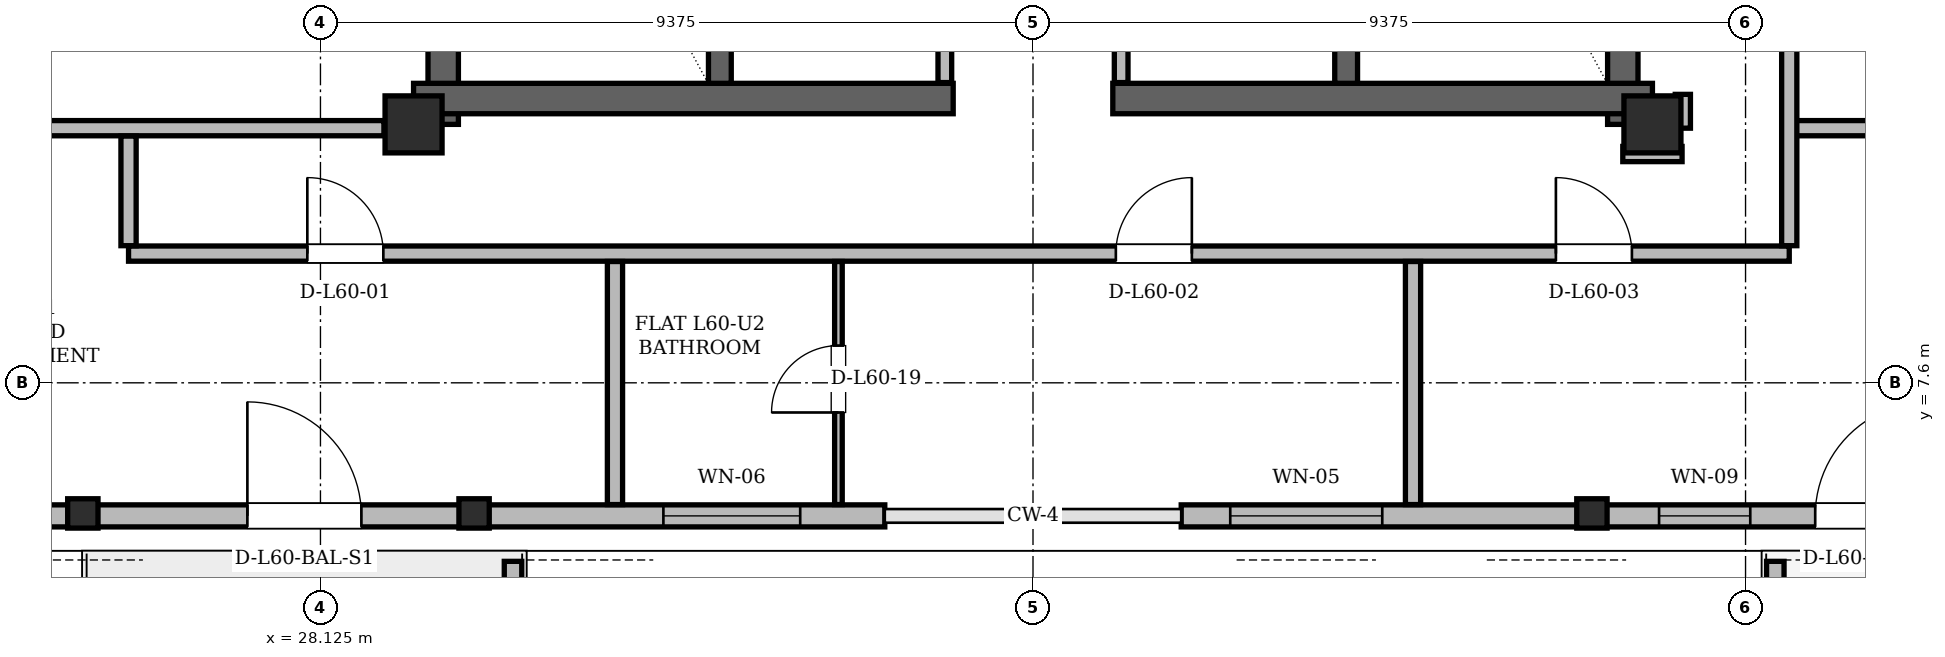
"""IFC4 building model, lengths in metres.
Left out: names, types, materials, properties, quantities, classifications, styles, units other than length and angle.
Written with IfcOpenShell. Run it as: python <this file> out.ifc"""

import sys

from ifc_helpers import new_model, si_unit, direction, frame, frame_2d, origin, origin_2d, place, context, subcontext, project, spatial, polyline, rectangle, hollow_rectangle, i_section, outline, extrude, element, fill, save


model = new_model("IFC4")
c1 = context("Model", 3, precision=1e-05, world=origin(), true_north=direction((0.0, 1.0)))
c2 = subcontext(c1, "Body", "Model", "MODEL_VIEW")
j1 = project(units=[si_unit("LENGTHUNIT", "METRE"), si_unit("PLANEANGLEUNIT", "RADIAN")], contexts=[c1])
p1 = place(None, origin())
s1 = spatial("IfcSite", under=j1, at=p1, CompositionType="ELEMENT")
p2 = place(p1, origin())
s2 = spatial("IfcBuilding", under=s1, at=p2, CompositionType="ELEMENT")
p3 = place(p2, frame((0.0, 0.0, 227.1)))
s3 = spatial("IfcBuildingStorey", under=s2, at=p3, CompositionType="ELEMENT", Elevation=227.1)
for number, where, z_axis, x_axis in (
    (1, (29.35, 11.0, 0.0), (0.0, 0.0, 1.0), (1.0, 0.0, 0.0)),
    (2, (45.65, 11.0, 0.0), (0.0, 0.0, 1.0), (1.0, 0.0, 0.0)),
):
    element("IfcColumn", number, at=place(p3, frame(where, z_axis=z_axis, x_axis=x_axis)), inside=s3, PredefinedType="COLUMN", context=c2, shape_type="SweptSolid", body=[
        extrude(hollow_rectangle(XDim=0.75, YDim=0.75, WallThickness=0.06, at=origin_2d()), origin(), (0.0, 0.0, 1.0), 3.6),
    ])
p4 = place(p3, frame((25.008, 5.849, 0.004), z_axis=(-0.00509802547, 0.018013023328, 0.999824755208), x_axis=(-0.962206045824, -0.272322465799, 0.0)))
e3 = element("IfcColumn", 3, at=p4, inside=s3, PredefinedType="COLUMN", context=c2, shape_type="SweptSolid", body=[
    extrude(i_section(OverallWidth=0.399, OverallDepth=0.386, WebThickness=0.021, FlangeThickness=0.033, at=origin_2d()), origin(), (0.0, 0.0, 1.0), 3.592),
])
for number, where, z_axis, x_axis in (
    (4, (30.152, 5.849, 0.004), (-0.003, 0.018, 1.0), (-0.987, -0.16, 0.0)),
    (5, (44.848, 5.849, 0.004), (0.003, 0.018, 1.0), (-0.987, 0.16, 0.0)),
):
    element("IfcColumn", number, at=place(p3, frame(where, z_axis=z_axis, x_axis=x_axis)), inside=s3, PredefinedType="COLUMN", context=c2, shape_type="SweptSolid", body=[
        extrude(i_section(OverallWidth=0.399, OverallDepth=0.386, WebThickness=0.021, FlangeThickness=0.033, at=origin_2d()), origin(), (0.0, 0.0, 1.0), 3.592),
    ])
for number, where, z_axis, x_axis in (
    (6, (29.74, 11.0, 0.0), (0.0, 0.0, 1.0), (0.0, 1.0, 0.0)),
    (7, (45.26, 11.0, 0.0), (0.0, 0.0, 1.0), (0.0, 1.0, 0.0)),
):
    element("IfcWall", number, at=place(p3, frame(where, z_axis=z_axis, x_axis=x_axis)), inside=s3, PredefinedType="SHEAR", context=c2, shape_type="SweptSolid", body=[
        extrude(rectangle(XDim=13.3, YDim=0.4, at=frame_2d((6.65, 0.0))), origin(), (0.0, 0.0, 1.0), 3.38),
    ])
for number, where, z_axis, x_axis in (
    (8, (29.35, 11.34, 0.0), (0.0, 0.0, 1.0), (1.0, 0.0, 0.0)),
    (9, (38.55, 11.34, 0.0), (0.0, 0.0, 1.0), (1.0, 0.0, 0.0)),
):
    element("IfcWall", number, at=place(p3, frame(where, z_axis=z_axis, x_axis=x_axis)), inside=s3, PredefinedType="SHEAR", context=c2, shape_type="SweptSolid", body=[
        extrude(rectangle(XDim=7.1, YDim=0.4, at=frame_2d((3.55, 0.0))), origin(), (0.0, 0.0, 1.0), 3.38),
    ])
for number, where, z_axis, x_axis in (
    (10, (33.38, 11.54, 0.0), (0.0, 0.0, 1.0), (0.0, 1.0, 0.0)),
    (11, (41.62, 11.54, 0.0), (0.0, 0.0, 1.0), (0.0, 1.0, 0.0)),
):
    element("IfcWall", number, at=place(p3, frame(where, z_axis=z_axis, x_axis=x_axis)), inside=s3, PredefinedType="SHEAR", context=c2, shape_type="SweptSolid", body=[
        extrude(rectangle(XDim=7.62, YDim=0.3, at=frame_2d((3.81, 0.0))), origin(), (0.0, 0.0, 1.0), 3.38),
    ])
p5 = place(p3, frame((19.129, 5.849, 0.0), z_axis=(0.0, 0.0, 1.0), x_axis=(1.0, 0.0, 0.0)))
e12 = element("IfcWall", 12, at=p5, inside=s3, PredefinedType="SOLIDWALL", context=c2, shape_type="SweptSolid", body=[
    extrude(rectangle(XDim=16.421, YDim=0.29, at=frame_2d((8.21, 0.0))), origin(), (0.0, 0.0, 1.0), 2.677),
])
p6 = place(p5, frame((8.034, 0.0, 0.0)))
e13 = element("IfcOpeningElement", 13, at=p6, cuts=e12, PredefinedType="OPENING", context=c2, shape_type="SweptSolid", body=[
    extrude(rectangle(XDim=1.5, YDim=2.2, at=frame_2d((0.75, 1.1))), frame((0.0, 0.145, 0.0), z_axis=(0.0, -1.0, 0.0), x_axis=(1.0, 0.0, 0.0)), (0.0, 0.0, 1.0), 0.29),
])
p7 = place(p5, frame((2.593, 0.0, 0.85)))
e14 = element("IfcOpeningElement", 14, at=p7, cuts=e12, PredefinedType="OPENING", context=c2, shape_type="SweptSolid", body=[
    extrude(rectangle(XDim=2.4, YDim=1.717, at=frame_2d((1.2, 0.858))), frame((0.0, 0.145, 0.0), z_axis=(0.0, -1.0, 0.0), x_axis=(1.0, 0.0, 0.0)), (0.0, 0.0, 1.0), 0.29),
])
p8 = place(p5, frame((13.508, 0.0, 0.85)))
e15 = element("IfcOpeningElement", 15, at=p8, cuts=e12, PredefinedType="OPENING", context=c2, shape_type="SweptSolid", body=[
    extrude(rectangle(XDim=1.8, YDim=1.717, at=frame_2d((0.9, 0.858))), frame((0.0, 0.145, 0.0), z_axis=(0.0, -1.0, 0.0), x_axis=(1.0, 0.0, 0.0)), (0.0, 0.0, 1.0), 0.29),
])
p9 = place(p3, frame((39.45, 5.849, 0.0), z_axis=(0.0, 0.0, 1.0), x_axis=(1.0, 0.0, 0.0)))
e16 = element("IfcWall", 16, at=p9, inside=s3, PredefinedType="SOLIDWALL", context=c2, shape_type="SweptSolid", body=[
    extrude(rectangle(XDim=16.421, YDim=0.29, at=frame_2d((8.21, 0.0))), origin(), (0.0, 0.0, 1.0), 2.677),
])
p10 = place(p9, frame((8.342, 0.0, 0.0)))
e17 = element("IfcOpeningElement", 17, at=p10, cuts=e16, PredefinedType="OPENING", context=c2, shape_type="SweptSolid", body=[
    extrude(rectangle(XDim=1.5, YDim=2.2, at=frame_2d((0.75, 1.1))), frame((0.0, 0.145, 0.0), z_axis=(0.0, -1.0, 0.0), x_axis=(1.0, 0.0, 0.0)), (0.0, 0.0, 1.0), 0.29),
])
p11 = place(p9, frame((0.645, 0.0, 0.85)))
e18 = element("IfcOpeningElement", 18, at=p11, cuts=e16, PredefinedType="OPENING", context=c2, shape_type="SweptSolid", body=[
    extrude(rectangle(XDim=2.0, YDim=1.717, at=frame_2d((1.0, 0.858))), frame((0.0, 0.145, 0.0), z_axis=(0.0, -1.0, 0.0), x_axis=(1.0, 0.0, 0.0)), (0.0, 0.0, 1.0), 0.29),
])
p12 = place(p9, frame((6.287, 0.0, 0.85)))
e19 = element("IfcOpeningElement", 19, at=p12, cuts=e16, PredefinedType="OPENING", context=c2, shape_type="SweptSolid", body=[
    extrude(rectangle(XDim=1.2, YDim=1.48, at=frame_2d((0.6, 0.74))), frame((0.0, 0.145, 0.0), z_axis=(0.0, -1.0, 0.0), x_axis=(1.0, 0.0, 0.0)), (0.0, 0.0, 1.0), 0.29),
])
p13 = place(p9, frame((11.903, 0.0, 0.85)))
e20 = element("IfcOpeningElement", 20, at=p13, cuts=e16, PredefinedType="OPENING", context=c2, shape_type="SweptSolid", body=[
    extrude(rectangle(XDim=1.2, YDim=1.48, at=frame_2d((0.6, 0.74))), frame((0.0, 0.145, 0.0), z_axis=(0.0, -1.0, 0.0), x_axis=(1.0, 0.0, 0.0)), (0.0, 0.0, 1.0), 0.29),
])
p14 = place(p3, frame((34.344, 43.135, 0.0), z_axis=(0.0, 0.0, 1.0), x_axis=(-0.499998927115, -0.866026023214, 0.0)))
e21 = element("IfcWall", 21, at=p14, inside=s3, PredefinedType="SOLIDWALL", context=c2, shape_type="SweptSolid", body=[
    extrude(rectangle(XDim=36.742, YDim=0.29, at=frame_2d((18.371, 0.0))), origin(), (0.0, 0.0, 1.0), 2.677),
])
p15 = place(p14, frame((8.664, 0.0, 0.0)))
e22 = element("IfcOpeningElement", 22, at=p15, cuts=e21, PredefinedType="OPENING", context=c2, shape_type="SweptSolid", body=[
    extrude(rectangle(XDim=1.5, YDim=2.2, at=frame_2d((0.75, 1.1))), frame((0.0, 0.145, 0.0), z_axis=(0.0, -1.0, 0.0), x_axis=(1.0, 0.0, 0.0)), (0.0, 0.0, 1.0), 0.29),
])
p16 = place(p14, frame((28.452, 0.0, 0.0)))
e23 = element("IfcOpeningElement", 23, at=p16, cuts=e21, PredefinedType="OPENING", context=c2, shape_type="SweptSolid", body=[
    extrude(rectangle(XDim=1.5, YDim=2.2, at=frame_2d((0.75, 1.1))), frame((0.0, 0.145, 0.0), z_axis=(0.0, -1.0, 0.0), x_axis=(1.0, 0.0, 0.0)), (0.0, 0.0, 1.0), 0.29),
])
p17 = place(p14, frame((22.282, 0.0, 0.85)))
e24 = element("IfcOpeningElement", 24, at=p17, cuts=e21, PredefinedType="OPENING", context=c2, shape_type="SweptSolid", body=[
    extrude(rectangle(XDim=2.4, YDim=1.717, at=frame_2d((1.2, 0.858))), frame((0.0, 0.145, 0.0), z_axis=(0.0, -1.0, 0.0), x_axis=(1.0, 0.0, 0.0)), (0.0, 0.0, 1.0), 0.29),
])
p18 = place(p14, frame((33.369, 0.0, 0.85)))
e25 = element("IfcOpeningElement", 25, at=p18, cuts=e21, PredefinedType="OPENING", context=c2, shape_type="SweptSolid", body=[
    extrude(rectangle(XDim=2.2, YDim=1.717, at=frame_2d((1.1, 0.858))), frame((0.0, 0.145, 0.0), z_axis=(0.0, -1.0, 0.0), x_axis=(1.0, 0.0, 0.0)), (0.0, 0.0, 1.0), 0.29),
])
p19 = place(p14, frame((11.999, 0.0, 0.85)))
e26 = element("IfcOpeningElement", 26, at=p19, cuts=e21, PredefinedType="OPENING", context=c2, shape_type="SweptSolid", body=[
    extrude(rectangle(XDim=2.4, YDim=1.717, at=frame_2d((1.2, 0.858))), frame((0.0, 0.145, 0.0), z_axis=(0.0, -1.0, 0.0), x_axis=(1.0, 0.0, 0.0)), (0.0, 0.0, 1.0), 0.29),
])
p20 = place(p14, frame((16.783, 0.0, 0.85)))
e27 = element("IfcOpeningElement", 27, at=p20, cuts=e21, PredefinedType="OPENING", context=c2, shape_type="SweptSolid", body=[
    extrude(rectangle(XDim=1.8, YDim=1.717, at=frame_2d((0.9, 0.858))), frame((0.0, 0.145, 0.0), z_axis=(0.0, -1.0, 0.0), x_axis=(1.0, 0.0, 0.0)), (0.0, 0.0, 1.0), 0.29),
])
p21 = place(p14, frame((3.365, 0.0, 0.85)))
e28 = element("IfcOpeningElement", 28, at=p21, cuts=e21, PredefinedType="OPENING", context=c2, shape_type="SweptSolid", body=[
    extrude(rectangle(XDim=1.2, YDim=1.48, at=frame_2d((0.6, 0.74))), frame((0.0, 0.145, 0.0), z_axis=(0.0, -1.0, 0.0), x_axis=(1.0, 0.0, 0.0)), (0.0, 0.0, 1.0), 0.29),
])
p22 = place(p14, frame((6.797, 0.0, 0.85)))
e29 = element("IfcOpeningElement", 29, at=p22, cuts=e21, PredefinedType="OPENING", context=c2, shape_type="SweptSolid", body=[
    extrude(rectangle(XDim=1.2, YDim=1.48, at=frame_2d((0.6, 0.74))), frame((0.0, 0.145, 0.0), z_axis=(0.0, -1.0, 0.0), x_axis=(1.0, 0.0, 0.0)), (0.0, 0.0, 1.0), 0.29),
])
for number, where, z_axis, x_axis in (
    (30, (30.658, 5.251, 0.0), (0.0, 0.0, 1.0), (0.0, -1.0, 0.0)),
    (31, (47.267, 5.251, 0.0), (0.0, 0.0, 1.0), (0.0, -1.0, 0.0)),
):
    element("IfcWall", number, at=place(p3, frame(where, z_axis=z_axis, x_axis=x_axis)), inside=s3, PredefinedType="PARAPET", context=c2, shape_type="SweptSolid", body=[
        extrude(outline(polyline([(0.0, 0.0), (2.042, 0.0), (2.042, 1.1), (0.0, 1.32), (0.0, 0.0)])), frame((0.0, 0.115, 0.0), z_axis=(0.0, -1.0, 0.0), x_axis=(1.0, 0.0, 0.0)), (0.0, 0.0, 1.0), 0.23),
    ])
p23 = place(p3, frame((36.34, 11.55, 0.0), z_axis=(0.0, 0.0, 1.0), x_axis=(0.0, 1.0, 0.0)))
e32 = element("IfcWall", 32, at=p23, inside=s3, PredefinedType="PARTITIONING", context=c2, shape_type="SweptSolid", body=[
    extrude(rectangle(XDim=5.55, YDim=0.18, at=frame_2d((2.775, 0.0))), origin(), (0.0, 0.0, 1.0), 3.38),
])
p24 = place(p23, frame((2.85, 0.0, 0.0)))
e33 = element("IfcOpeningElement", 33, at=p24, cuts=e32, PredefinedType="OPENING", context=c2, shape_type="SweptSolid", body=[
    extrude(rectangle(XDim=0.95, YDim=2.1, at=frame_2d((0.475, 1.05))), frame((0.0, 0.09, 0.0), z_axis=(0.0, -1.0, 0.0), x_axis=(1.0, 0.0, 0.0)), (0.0, 0.0, 1.0), 0.18),
])
p25 = place(p3, frame((38.66, 11.55, 0.0), z_axis=(0.0, 0.0, 1.0), x_axis=(0.0, 1.0, 0.0)))
e34 = element("IfcWall", 34, at=p25, inside=s3, PredefinedType="PARTITIONING", context=c2, shape_type="SweptSolid", body=[
    extrude(rectangle(XDim=5.55, YDim=0.18, at=frame_2d((2.775, 0.0))), origin(), (0.0, 0.0, 1.0), 3.38),
])
p26 = place(p25, frame((2.0, 0.0, 0.0)))
e35 = element("IfcOpeningElement", 35, at=p26, cuts=e34, PredefinedType="OPENING", context=c2, shape_type="SweptSolid", body=[
    extrude(rectangle(XDim=0.95, YDim=2.1, at=frame_2d((0.475, 1.05))), frame((0.0, 0.09, 0.0), z_axis=(0.0, -1.0, 0.0), x_axis=(1.0, 0.0, 0.0)), (0.0, 0.0, 1.0), 0.18),
])
p27 = place(p3, frame((25.6, 9.3, 0.0), z_axis=(0.0, 0.0, 1.0), x_axis=(1.0, 0.0, 0.0)))
e36 = element("IfcWall", 36, at=p27, inside=s3, PredefinedType="PARTITIONING", context=c2, shape_type="SweptSolid", body=[
    extrude(rectangle(XDim=21.85, YDim=0.2, at=frame_2d((10.925, 0.0))), origin(), (0.0, 0.0, 1.0), 2.913),
])
p28 = place(p27, frame((2.352, 0.0, 0.0)))
e37 = element("IfcOpeningElement", 37, at=p28, cuts=e36, PredefinedType="OPENING", context=c2, shape_type="SweptSolid", body=[
    extrude(rectangle(XDim=1.0, YDim=2.18, at=frame_2d((0.5, 1.09))), frame((0.0, 0.1, 0.0), z_axis=(0.0, -1.0, 0.0), x_axis=(1.0, 0.0, 0.0)), (0.0, 0.0, 1.0), 0.2),
])
p29 = place(p27, frame((12.99, 0.0, 0.0)))
e38 = element("IfcOpeningElement", 38, at=p29, cuts=e36, PredefinedType="OPENING", context=c2, shape_type="SweptSolid", body=[
    extrude(rectangle(XDim=1.0, YDim=2.18, at=frame_2d((0.5, 1.09))), frame((0.0, 0.1, 0.0), z_axis=(0.0, -1.0, 0.0), x_axis=(1.0, 0.0, 0.0)), (0.0, 0.0, 1.0), 0.2),
])
p30 = place(p27, frame((18.78, 0.0, 0.0)))
e39 = element("IfcOpeningElement", 39, at=p30, cuts=e36, PredefinedType="OPENING", context=c2, shape_type="SweptSolid", body=[
    extrude(rectangle(XDim=1.0, YDim=2.18, at=frame_2d((0.5, 1.09))), frame((0.0, 0.1, 0.0), z_axis=(0.0, -1.0, 0.0), x_axis=(1.0, 0.0, 0.0)), (0.0, 0.0, 1.0), 0.2),
])
p31 = place(p3, frame((45.26, 10.61, 0.0), z_axis=(0.0, 0.0, 1.0), x_axis=(1.0, 0.0, 0.0)))
e40 = element("IfcWall", 40, at=p31, inside=s3, PredefinedType="PARTITIONING", context=c2, shape_type="SweptSolid", body=[
    extrude(rectangle(XDim=0.78, YDim=0.2, at=frame_2d((0.39, 0.0))), origin(), (0.0, 0.0, 1.0), 3.38),
])
p32 = place(p3, frame((16.36, 10.95, 0.0), z_axis=(0.0, 0.0, 1.0), x_axis=(1.0, 0.0, 0.0)))
e41 = element("IfcWall", 41, at=p32, inside=s3, PredefinedType="PARTITIONING", context=c2, shape_type="SweptSolid", body=[
    extrude(rectangle(XDim=12.6, YDim=0.2, at=frame_2d((6.3, 0.0))), origin(), (0.0, 0.0, 1.0), 2.913),
])
p33 = place(p3, frame((47.45, 10.95, 0.0), z_axis=(0.0, 0.0, 1.0), x_axis=(1.0, 0.0, 0.0)))
e42 = element("IfcWall", 42, at=p33, inside=s3, PredefinedType="PARTITIONING", context=c2, shape_type="SweptSolid", body=[
    extrude(rectangle(XDim=11.19, YDim=0.2, at=frame_2d((5.595, 0.0))), origin(), (0.0, 0.0, 1.0), 2.913),
])
p34 = place(p3, frame((25.6, 9.404, 0.0), z_axis=(0.0, 0.0, 1.0), x_axis=(0.0, 1.0, 0.0)))
e43 = element("IfcWall", 43, at=p34, inside=s3, PredefinedType="PARTITIONING", context=c2, shape_type="SweptSolid", body=[
    extrude(rectangle(XDim=1.442, YDim=0.2, at=frame_2d((0.721, 0.0))), origin(), (0.0, 0.0, 1.0), 3.38),
])
p35 = place(p3, frame((32.0, 5.998, 0.0), z_axis=(0.0, 0.0, 1.0), x_axis=(0.0, 1.0, 0.0)))
e44 = element("IfcWall", 44, at=p35, inside=s3, PredefinedType="PARTITIONING", context=c2, shape_type="SweptSolid", body=[
    extrude(rectangle(XDim=3.198, YDim=0.2, at=frame_2d((1.599, 0.0))), origin(), (0.0, 0.0, 1.0), 2.966),
])
p36 = place(p3, frame((34.94, 5.998, 0.0), z_axis=(0.0, 0.0, 1.0), x_axis=(0.0, 1.0, 0.0)))
e45 = element("IfcWall", 45, at=p36, inside=s3, PredefinedType="PARTITIONING", context=c2, shape_type="SweptSolid", body=[
    extrude(rectangle(XDim=3.198, YDim=0.1, at=frame_2d((1.599, 0.0))), origin(), (0.0, 0.0, 1.0), 3.38),
])
p37 = place(p36, frame((1.211, 0.0, 0.0)))
e46 = element("IfcOpeningElement", 46, at=p37, cuts=e45, PredefinedType="OPENING", context=c2, shape_type="SweptSolid", body=[
    extrude(rectangle(XDim=0.88, YDim=2.08, at=frame_2d((0.44, 1.04))), frame((0.0, 0.05, 0.0), z_axis=(0.0, -1.0, 0.0), x_axis=(1.0, 0.0, 0.0)), (0.0, 0.0, 1.0), 0.1),
])
p38 = place(p3, frame((42.5, 5.998, 0.0), z_axis=(0.0, 0.0, 1.0), x_axis=(0.0, 1.0, 0.0)))
e47 = element("IfcWall", 47, at=p38, inside=s3, PredefinedType="PARTITIONING", context=c2, shape_type="SweptSolid", body=[
    extrude(rectangle(XDim=3.198, YDim=0.2, at=frame_2d((1.599, 0.0))), origin(), (0.0, 0.0, 1.0), 3.38),
])
p39 = place(p3, frame((46.05, 10.95, 0.0), z_axis=(0.0, 0.0, 1.0), x_axis=(0.0, 1.0, 0.0)))
e48 = element("IfcWall", 48, at=p39, inside=s3, PredefinedType="PARTITIONING", context=c2, shape_type="SweptSolid", body=[
    extrude(rectangle(XDim=0.445, YDim=0.2, at=frame_2d((0.223, 0.0))), origin(), (0.0, 0.0, 1.0), 2.913),
])
p40 = place(p3, frame((47.45, 9.404, 0.0), z_axis=(0.0, 0.0, 1.0), x_axis=(0.0, 1.0, 0.0)))
e49 = element("IfcWall", 49, at=p40, inside=s3, PredefinedType="PARTITIONING", context=c2, shape_type="SweptSolid", body=[
    extrude(rectangle(XDim=16.462, YDim=0.2, at=frame_2d((8.231, 0.0))), origin(), (0.0, 0.0, 1.0), 2.913),
])
p41 = place(p40, frame((3.163, 0.0, 0.0)))
e50 = element("IfcOpeningElement", 50, at=p41, cuts=e49, PredefinedType="OPENING", context=c2, shape_type="SweptSolid", body=[
    extrude(rectangle(XDim=1.0, YDim=2.18, at=frame_2d((0.5, 1.09))), frame((0.0, 0.1, 0.0), z_axis=(0.0, -1.0, 0.0), x_axis=(1.0, 0.0, 0.0)), (0.0, 0.0, 1.0), 0.2),
])
p42 = place(p40, frame((9.778, 0.0, 0.0)))
e51 = element("IfcOpeningElement", 51, at=p42, cuts=e49, PredefinedType="OPENING", context=c2, shape_type="SweptSolid", body=[
    extrude(rectangle(XDim=1.0, YDim=2.18, at=frame_2d((0.5, 1.09))), frame((0.0, 0.1, 0.0), z_axis=(0.0, -1.0, 0.0), x_axis=(1.0, 0.0, 0.0)), (0.0, 0.0, 1.0), 0.2),
])
p43 = place(p6, origin())
e52 = element("IfcDoor", 52, at=p43, inside=s3, OperationType="SINGLE_SWING_LEFT", PredefinedType="DOOR", context=c2, shape_type="SweptSolid", body=[
    extrude(rectangle(XDim=1.5, YDim=2.2, at=frame_2d((0.75, 1.1))), frame((0.0, 0.025, 0.0), z_axis=(0.0, -1.0, 0.0), x_axis=(1.0, 0.0, 0.0)), (0.0, 0.0, 1.0), 0.05),
])
fill(e13, e52)
p44 = place(p8, origin())
e53 = element("IfcWindow", 53, at=p44, inside=s3, PartitioningType="SINGLE_PANEL", PredefinedType="WINDOW", context=c2, shape_type="SweptSolid", body=[
    extrude(rectangle(XDim=1.8, YDim=1.717, at=frame_2d((0.9, 0.858))), frame((0.0, 0.03, 0.0), z_axis=(0.0, -1.0, 0.0), x_axis=(1.0, 0.0, 0.0)), (0.0, 0.0, 1.0), 0.06),
])
fill(e15, e53)
p45 = place(p10, origin())
e54 = element("IfcDoor", 54, at=p45, inside=s3, OperationType="SINGLE_SWING_RIGHT", PredefinedType="DOOR", context=c2, shape_type="SweptSolid", body=[
    extrude(rectangle(XDim=1.5, YDim=2.2, at=frame_2d((0.75, 1.1))), frame((0.0, 0.025, 0.0), z_axis=(0.0, -1.0, 0.0), x_axis=(1.0, 0.0, 0.0)), (0.0, 0.0, 1.0), 0.05),
])
fill(e17, e54)
p46 = place(p11, origin())
e55 = element("IfcWindow", 55, at=p46, inside=s3, PartitioningType="SINGLE_PANEL", PredefinedType="WINDOW", context=c2, shape_type="SweptSolid", body=[
    extrude(rectangle(XDim=2.0, YDim=1.717, at=frame_2d((1.0, 0.858))), frame((0.0, 0.03, 0.0), z_axis=(0.0, -1.0, 0.0), x_axis=(1.0, 0.0, 0.0)), (0.0, 0.0, 1.0), 0.06),
])
fill(e18, e55)
p47 = place(p12, origin())
e56 = element("IfcWindow", 56, at=p47, inside=s3, PartitioningType="SINGLE_PANEL", PredefinedType="WINDOW", context=c2, shape_type="SweptSolid", body=[
    extrude(rectangle(XDim=1.2, YDim=1.48, at=frame_2d((0.6, 0.74))), frame((0.0, 0.03, 0.0), z_axis=(0.0, -1.0, 0.0), x_axis=(1.0, 0.0, 0.0)), (0.0, 0.0, 1.0), 0.06),
])
fill(e19, e56)
p48 = place(p28, origin())
e57 = element("IfcDoor", 57, at=p48, inside=s3, OperationType="SINGLE_SWING_LEFT", PredefinedType="DOOR", context=c2, shape_type="SweptSolid", body=[
    extrude(rectangle(XDim=1.0, YDim=2.18, at=frame_2d((0.5, 1.09))), frame((0.0, 0.025, 0.0), z_axis=(0.0, -1.0, 0.0), x_axis=(1.0, 0.0, 0.0)), (0.0, 0.0, 1.0), 0.05),
])
fill(e37, e57)
p49 = place(p29, origin())
e58 = element("IfcDoor", 58, at=p49, inside=s3, OperationType="SINGLE_SWING_RIGHT", PredefinedType="DOOR", context=c2, shape_type="SweptSolid", body=[
    extrude(rectangle(XDim=1.0, YDim=2.18, at=frame_2d((0.5, 1.09))), frame((0.0, 0.025, 0.0), z_axis=(0.0, -1.0, 0.0), x_axis=(1.0, 0.0, 0.0)), (0.0, 0.0, 1.0), 0.05),
])
fill(e38, e58)
p50 = place(p30, origin())
e59 = element("IfcDoor", 59, at=p50, inside=s3, OperationType="SINGLE_SWING_LEFT", PredefinedType="DOOR", context=c2, shape_type="SweptSolid", body=[
    extrude(rectangle(XDim=1.0, YDim=2.18, at=frame_2d((0.5, 1.09))), frame((0.0, 0.025, 0.0), z_axis=(0.0, -1.0, 0.0), x_axis=(1.0, 0.0, 0.0)), (0.0, 0.0, 1.0), 0.05),
])
fill(e39, e59)
p51 = place(p37, origin())
e60 = element("IfcDoor", 60, at=p51, inside=s3, OperationType="SINGLE_SWING_LEFT", PredefinedType="DOOR", context=c2, shape_type="SweptSolid", body=[
    extrude(rectangle(XDim=0.88, YDim=2.08, at=frame_2d((0.44, 1.04))), frame((0.0, 0.025, 0.0), z_axis=(0.0, -1.0, 0.0), x_axis=(1.0, 0.0, 0.0)), (0.0, 0.0, 1.0), 0.05),
])
fill(e46, e60)
save(model, sys.argv[1])
